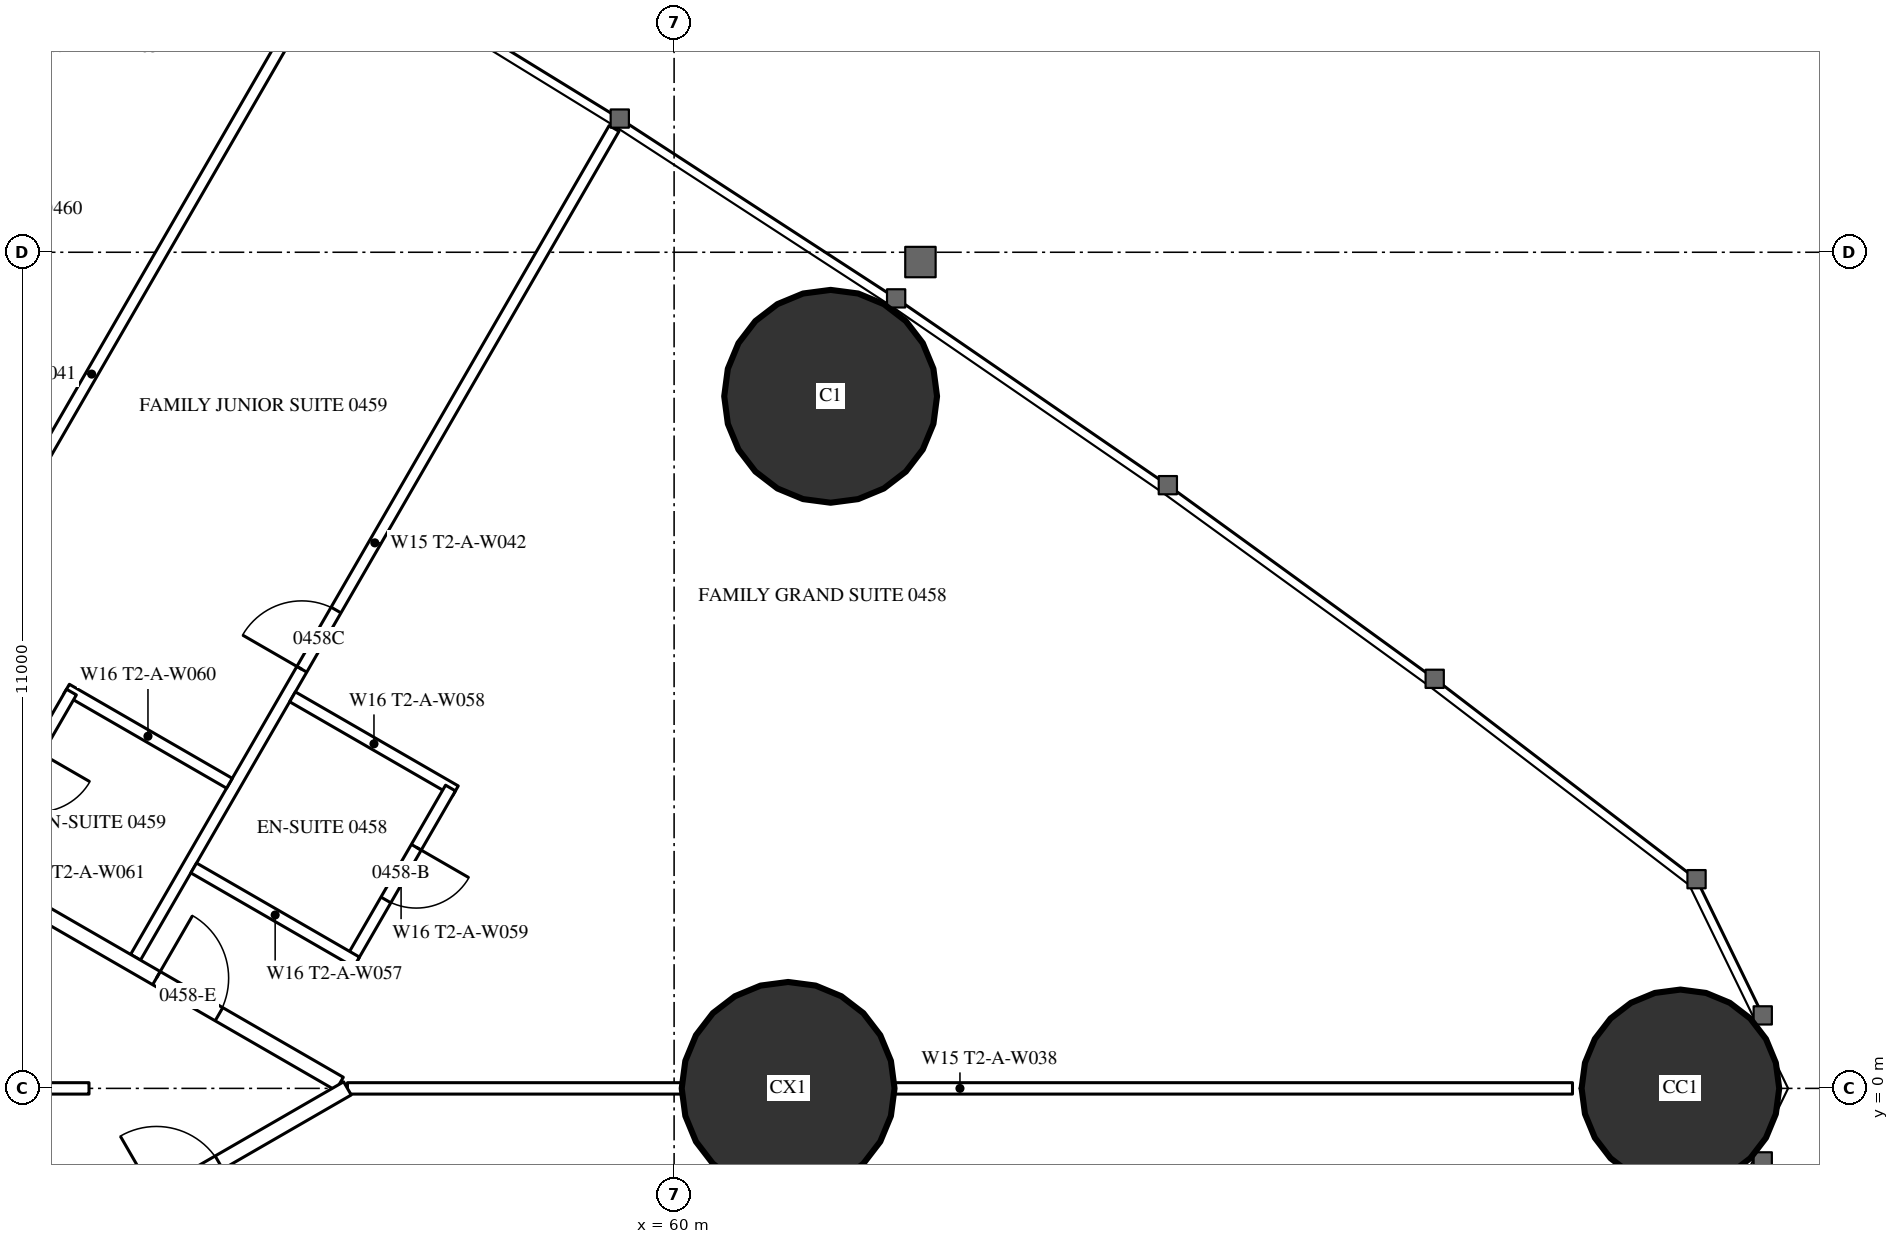
"""IFC4 building model, lengths in metres.
Left out: names, types, materials, properties, quantities, classifications, styles, units other than length and angle.
Written with IfcOpenShell. Run it as: python <this file> out.ifc"""

import sys

from ifc_helpers import new_model, si_unit, direction, frame, frame_2d, origin, origin_2d, place, context, subcontext, project, spatial, rectangle, hollow_circle, extrude, element, fill, save


model = new_model("IFC4")
c1 = context("Model", 3, precision=1e-05, world=origin(), true_north=direction((0.0, 1.0)))
c2 = subcontext(c1, "Body", "Model", "MODEL_VIEW")
j1 = project(units=[si_unit("LENGTHUNIT", "METRE"), si_unit("PLANEANGLEUNIT", "RADIAN")], contexts=[c1])
p1 = place(None, origin())
s1 = spatial("IfcSite", under=j1, at=p1, CompositionType="ELEMENT")
p2 = place(p1, origin())
s2 = spatial("IfcBuilding", under=s1, at=p2, CompositionType="ELEMENT")
p3 = place(p2, frame((0.0, 0.0, 21.5)))
s3 = spatial("IfcBuildingStorey", under=s2, at=p3, CompositionType="ELEMENT", Elevation=21.5)
p4 = place(p3, frame((73.239, 0.0, 0.0), z_axis=(0.0, 0.0, 1.0), x_axis=(1.0, 0.0, 0.0)))
e1 = element("IfcColumn", 1, at=p4, inside=s3, PredefinedType="COLUMN", context=c2, shape_type="SweptSolid", body=[
    extrude(hollow_circle(Radius=1.3, WallThickness=0.1, at=origin_2d()), origin(), (0.0, 0.0, 1.0), 3.5),
])
p5 = place(p3, frame((62.059, 9.105, 0.0), z_axis=(0.0, 0.0, 1.0), x_axis=(1.0, 0.0, 0.0)))
e2 = element("IfcColumn", 2, at=p5, inside=s3, PredefinedType="COLUMN", context=c2, shape_type="SweptSolid", body=[
    extrude(hollow_circle(Radius=1.4, WallThickness=0.12, at=origin_2d()), origin(), (0.0, 0.0, 1.0), 3.5),
])
p6 = place(p3, frame((61.5, 0.0, 0.0), z_axis=(0.0, 0.0, 1.0), x_axis=(1.0, 0.0, 0.0)))
e3 = element("IfcColumn", 3, at=p6, inside=s3, PredefinedType="COLUMN", context=c2, shape_type="SweptSolid", body=[
    extrude(hollow_circle(Radius=1.4, WallThickness=0.1, at=origin_2d()), origin(), (0.0, 0.0, 1.0), 3.5),
])
p7 = place(p3, frame((49.159, 3.893, 0.0), z_axis=(0.0, 0.0, 1.0), x_axis=(0.499995664361, 0.866027906952, 0.0)))
e4 = element("IfcWall", 4, at=p7, inside=s3, PredefinedType="PARTITIONING", context=c2, shape_type="SweptSolid", body=[
    extrude(rectangle(XDim=12.711, YDim=0.15, at=frame_2d((6.356, 0.0))), origin(), (0.0, 0.0, 1.0), 3.25),
])
p8 = place(p3, frame((52.915, 1.725, 0.0), z_axis=(0.0, 0.0, 1.0), x_axis=(0.499997163113, 0.866027041656, 0.0)))
e5 = element("IfcWall", 5, at=p8, inside=s3, PredefinedType="PARTITIONING", context=c2, shape_type="SweptSolid", body=[
    extrude(rectangle(XDim=12.591, YDim=0.15, at=frame_2d((6.295, 0.0))), origin(), (0.0, 0.0, 1.0), 3.25),
])
p9 = place(p8, frame((4.375, 0.0, 0.0)))
e6 = element("IfcOpeningElement", 6, at=p9, cuts=e5, PredefinedType="OPENING", context=c2, shape_type="SweptSolid", body=[
    extrude(rectangle(XDim=0.9, YDim=2.2, at=frame_2d((0.45, 1.1))), frame((0.0, 0.085, 0.0), z_axis=(0.0, -1.0, 0.0), x_axis=(1.0, 0.0, 0.0)), (0.0, 0.0, 1.0), 0.17),
])
p10 = place(p3, frame((55.702, 0.0, 0.0), z_axis=(0.0, 0.0, 1.0), x_axis=(1.0, 0.0, 0.0)))
e7 = element("IfcWall", 7, at=p10, inside=s3, PredefinedType="PARTITIONING", context=c2, shape_type="SweptSolid", body=[
    extrude(rectangle(XDim=16.117, YDim=0.15, at=frame_2d((8.059, 0.0))), origin(), (0.0, 0.0, 1.0), 2.25),
])
p11 = place(p3, frame((36.834, 10.894, 0.0), z_axis=(0.0, 0.0, 1.0), x_axis=(0.866028157229, -0.499995230863, 0.0)))
e8 = element("IfcWall", 8, at=p11, inside=s3, PredefinedType="PARTITIONING", context=c2, shape_type="SweptSolid", body=[
    extrude(rectangle(XDim=21.667, YDim=0.2, at=frame_2d((10.833, 0.0))), origin(), (0.0, 0.0, 1.0), 3.25),
])
p12 = place(p11, frame((18.885, 0.0, 0.0)))
e9 = element("IfcOpeningElement", 9, at=p12, cuts=e8, PredefinedType="OPENING", context=c2, shape_type="SweptSolid", body=[
    extrude(rectangle(XDim=0.95, YDim=2.2, at=frame_2d((0.475, 1.1))), frame((0.0, 0.11, 0.0), z_axis=(0.0, -1.0, 0.0), x_axis=(1.0, 0.0, 0.0)), (0.0, 0.0, 1.0), 0.22),
])
p13 = place(p11, frame((14.835, 0.0, 0.0)))
e10 = element("IfcOpeningElement", 10, at=p13, cuts=e8, PredefinedType="OPENING", context=c2, shape_type="SweptSolid", body=[
    extrude(rectangle(XDim=0.95, YDim=2.2, at=frame_2d((0.475, 1.1))), frame((0.0, 0.11, 0.0), z_axis=(0.0, -1.0, 0.0), x_axis=(1.0, 0.0, 0.0)), (0.0, 0.0, 1.0), 0.22),
])
p14 = place(p11, frame((12.85, 0.0, 0.0)))
e11 = element("IfcOpeningElement", 11, at=p14, cuts=e8, PredefinedType="OPENING", context=c2, shape_type="SweptSolid", body=[
    extrude(rectangle(XDim=0.95, YDim=2.2, at=frame_2d((0.475, 1.1))), frame((0.0, 0.11, 0.0), z_axis=(0.0, -1.0, 0.0), x_axis=(1.0, 0.0, 0.0)), (0.0, 0.0, 1.0), 0.22),
])
p15 = place(p11, frame((1.542, 0.0, 0.0)))
e12 = element("IfcOpeningElement", 12, at=p15, cuts=e8, PredefinedType="OPENING", context=c2, shape_type="SweptSolid", body=[
    extrude(rectangle(XDim=0.95, YDim=2.2, at=frame_2d((0.475, 1.1))), frame((0.0, 0.11, 0.0), z_axis=(0.0, -1.0, 0.0), x_axis=(1.0, 0.0, 0.0)), (0.0, 0.0, 1.0), 0.22),
])
p16 = place(p3, frame((49.131, -3.794, 0.0), z_axis=(0.0, 0.0, 1.0), x_axis=(0.866030732979, 0.499990769451, 0.0)))
e13 = element("IfcWall", 13, at=p16, inside=s3, PredefinedType="PARTITIONING", context=c2, shape_type="SweptSolid", body=[
    extrude(rectangle(XDim=7.588, YDim=0.2, at=frame_2d((3.794, 0.0))), origin(), (0.0, 0.0, 1.0), 3.25),
])
p17 = place(p16, frame((2.986, 0.0, 0.0)))
e14 = element("IfcOpeningElement", 14, at=p17, cuts=e13, PredefinedType="OPENING", context=c2, shape_type="SweptSolid", body=[
    extrude(rectangle(XDim=0.95, YDim=2.2, at=frame_2d((0.475, 1.1))), frame((0.0, 0.11, 0.0), z_axis=(0.0, -1.0, 0.0), x_axis=(1.0, 0.0, 0.0)), (0.0, 0.0, 1.0), 0.22),
])
p18 = place(p16, frame((4.686, 0.0, 0.0)))
e15 = element("IfcOpeningElement", 15, at=p18, cuts=e13, PredefinedType="OPENING", context=c2, shape_type="SweptSolid", body=[
    extrude(rectangle(XDim=0.95, YDim=2.2, at=frame_2d((0.475, 1.1))), frame((0.0, 0.11, 0.0), z_axis=(0.0, -1.0, 0.0), x_axis=(1.0, 0.0, 0.0)), (0.0, 0.0, 1.0), 0.22),
])
p19 = place(p3, frame((54.98, 5.151, 0.0), z_axis=(0.0, 0.0, 1.0), x_axis=(0.86604923931, -0.499958713387, 0.0)))
e16 = element("IfcWall", 16, at=p19, inside=s3, PredefinedType="PARTITIONING", context=c2, shape_type="SweptSolid", body=[
    extrude(rectangle(XDim=2.475, YDim=0.15, at=frame_2d((1.237, 0.0))), origin(), (0.0, 0.0, 1.0), 3.25),
])
p20 = place(p3, frame((55.758, 1.7, 0.0), z_axis=(0.0, 0.0, 1.0), x_axis=(0.500006934395, 0.866021400173, 0.0)))
e17 = element("IfcWall", 17, at=p20, inside=s3, PredefinedType="PARTITIONING", context=c2, shape_type="SweptSolid", body=[
    extrude(rectangle(XDim=2.6, YDim=0.15, at=frame_2d((1.3, 0.0))), origin(), (0.0, 0.0, 1.0), 3.25),
])
p21 = place(p20, frame((0.9, 0.0, 0.0)))
e18 = element("IfcOpeningElement", 18, at=p21, cuts=e17, PredefinedType="OPENING", context=c2, shape_type="SweptSolid", body=[
    extrude(rectangle(XDim=0.8, YDim=2.2, at=frame_2d((0.4, 1.1))), frame((0.0, 0.085, 0.0), z_axis=(0.0, -1.0, 0.0), x_axis=(1.0, 0.0, 0.0)), (0.0, 0.0, 1.0), 0.17),
])
for number, where, z_axis, x_axis in (
    (19, (53.68, 2.9, 0.0), (0.0, 0.0, 1.0), (0.866, -0.5, 0.0)),
    (20, (52.006, 5.251, 0.0), (0.0, 0.0, 1.0), (0.866, -0.5, 0.0)),
):
    element("IfcWall", number, at=place(p3, frame(where, z_axis=z_axis, x_axis=x_axis)), inside=s3, PredefinedType="PARTITIONING", context=c2, shape_type="SweptSolid", body=[
        extrude(rectangle(XDim=2.475, YDim=0.15, at=frame_2d((1.237, 0.0))), origin(), (0.0, 0.0, 1.0), 3.25),
    ])
p22 = place(p3, frame((50.771, 2.962, 0.0), z_axis=(0.0, 0.0, 1.0), x_axis=(0.500006934395, 0.866021400173, 0.0)))
e21 = element("IfcWall", 21, at=p22, inside=s3, PredefinedType="PARTITIONING", context=c2, shape_type="SweptSolid", body=[
    extrude(rectangle(XDim=2.6, YDim=0.15, at=frame_2d((1.3, 0.0))), origin(), (0.0, 0.0, 1.0), 3.25),
])
p23 = place(p22, frame((0.9, 0.0, 0.0)))
e22 = element("IfcOpeningElement", 22, at=p23, cuts=e21, PredefinedType="OPENING", context=c2, shape_type="SweptSolid", body=[
    extrude(rectangle(XDim=0.8, YDim=2.2, at=frame_2d((0.4, 1.1))), frame((0.0, 0.085, 0.0), z_axis=(0.0, -1.0, 0.0), x_axis=(1.0, 0.0, 0.0)), (0.0, 0.0, 1.0), 0.17),
])
p24 = place(p3, frame((44.575, 0.0, 0.0), z_axis=(0.0, 0.0, 1.0), x_axis=(1.0, 0.0, 0.0)))
e23 = element("IfcWall", 23, at=p24, inside=s3, PredefinedType="PARTITIONING", context=c2, shape_type="SweptSolid", body=[
    extrude(rectangle(XDim=7.727, YDim=0.15, at=frame_2d((3.864, 0.0))), origin(), (0.0, 0.0, 1.0), 2.25),
])
p25 = place(p18, origin())
e24 = element("IfcDoor", 24, at=p25, inside=s3, OperationType="SINGLE_SWING_LEFT", PredefinedType="DOOR", context=c2, shape_type="SweptSolid", body=[
    extrude(rectangle(XDim=0.95, YDim=2.2, at=frame_2d((0.475, 1.1))), frame((0.0, 0.025, 0.0), z_axis=(0.0, -1.0, 0.0), x_axis=(1.0, 0.0, 0.0)), (0.0, 0.0, 1.0), 0.05),
])
fill(e15, e24)
p26 = place(p21, origin())
e25 = element("IfcDoor", 25, at=p26, inside=s3, OperationType="SINGLE_SWING_RIGHT", PredefinedType="DOOR", context=c2, shape_type="SweptSolid", body=[
    extrude(rectangle(XDim=0.8, YDim=2.2, at=frame_2d((0.4, 1.1))), frame((0.0, 0.025, 0.0), z_axis=(0.0, -1.0, 0.0), x_axis=(1.0, 0.0, 0.0)), (0.0, 0.0, 1.0), 0.05),
])
fill(e18, e25)
p27 = place(p12, origin())
e26 = element("IfcDoor", 26, at=p27, inside=s3, OperationType="SINGLE_SWING_LEFT", PredefinedType="DOOR", context=c2, shape_type="SweptSolid", body=[
    extrude(rectangle(XDim=0.95, YDim=2.2, at=frame_2d((0.475, 1.1))), frame((0.0, 0.025, 0.0), z_axis=(0.0, -1.0, 0.0), x_axis=(1.0, 0.0, 0.0)), (0.0, 0.0, 1.0), 0.05),
])
fill(e9, e26)
p28 = place(p9, origin())
e27 = element("IfcDoor", 27, at=p28, inside=s3, OperationType="SINGLE_SWING_LEFT", PredefinedType="DOOR", context=c2, shape_type="SweptSolid", body=[
    extrude(rectangle(XDim=0.9, YDim=2.2, at=frame_2d((0.45, 1.1))), frame((0.0, 0.025, 0.0), z_axis=(0.0, -1.0, 0.0), x_axis=(1.0, 0.0, 0.0)), (0.0, 0.0, 1.0), 0.05),
])
fill(e6, e27)
save(model, sys.argv[1])
